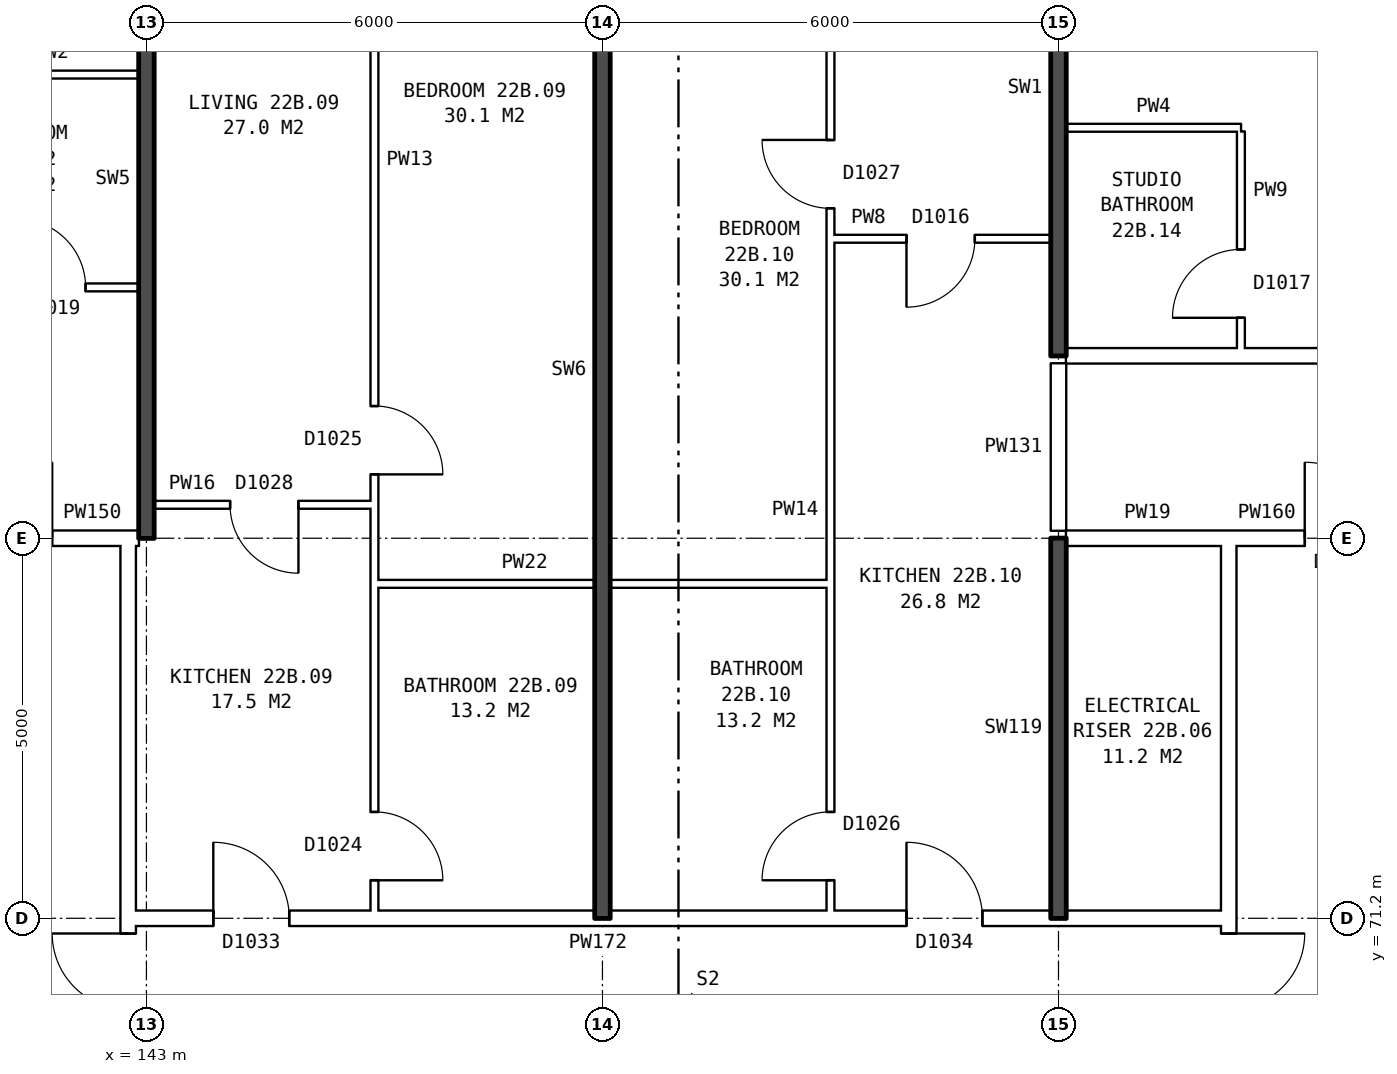
"""IFC4 building model, lengths in metres.
Left out: names, types, materials, properties, quantities, classifications, styles, units other than length and angle.
Written with IfcOpenShell. Run it as: python <this file> out.ifc"""

import sys

from ifc_helpers import new_model, si_unit, direction, frame, frame_2d, origin, place, context, subcontext, project, spatial, rectangle, extrude, element, fill, save


model = new_model("IFC4")
c1 = context("Model", 3, precision=1e-05, world=origin(), true_north=direction((0.0, 1.0)))
c2 = subcontext(c1, "Body", "Model", "MODEL_VIEW")
j1 = project(units=[si_unit("LENGTHUNIT", "METRE"), si_unit("PLANEANGLEUNIT", "RADIAN")], contexts=[c1])
p1 = place(None, origin())
s1 = spatial("IfcSite", under=j1, at=p1, CompositionType="ELEMENT")
p2 = place(p1, origin())
s2 = spatial("IfcBuilding", under=s1, at=p2, CompositionType="ELEMENT")
p3 = place(p2, frame((0.0, 0.0, 80.9)))
s3 = spatial("IfcBuildingStorey", under=s2, at=p3, CompositionType="ELEMENT", Elevation=80.9)
p4 = place(p3, frame((142.76, 63.9, 0.0), z_axis=(0.0, 0.0, 1.0), x_axis=(0.0, 1.0, 0.0)))
e1 = element("IfcWall", 1, at=p4, inside=s3, PredefinedType="PARTITIONING", context=c2, shape_type="SweptSolid", body=[
    extrude(rectangle(XDim=12.2, YDim=0.2, at=frame_2d((6.1, 0.0))), origin(), (0.0, 0.0, 1.0), 2.85),
])
p5 = place(p4, frame((5.1, 0.0, 0.0)))
e2 = element("IfcOpeningElement", 2, at=p5, cuts=e1, PredefinedType="OPENING", context=c2, shape_type="SweptSolid", body=[
    extrude(rectangle(XDim=2.0, YDim=2.1, at=frame_2d((1.0, 1.05))), frame((0.0, 0.11, 0.0), z_axis=(0.0, -1.0, 0.0), x_axis=(1.0, 0.0, 0.0)), (0.0, 0.0, 1.0), 0.22),
])
p6 = place(p3, frame((157.24, 63.9, 0.0), z_axis=(0.0, 0.0, 1.0), x_axis=(0.0, 1.0, 0.0)))
e3 = element("IfcWall", 3, at=p6, inside=s3, PredefinedType="PARTITIONING", context=c2, shape_type="SweptSolid", body=[
    extrude(rectangle(XDim=12.2, YDim=0.2, at=frame_2d((6.1, 0.0))), origin(), (0.0, 0.0, 1.0), 2.85),
])
p7 = place(p6, frame((5.1, 0.0, 0.0)))
e4 = element("IfcOpeningElement", 4, at=p7, cuts=e3, PredefinedType="OPENING", context=c2, shape_type="SweptSolid", body=[
    extrude(rectangle(XDim=2.0, YDim=2.1, at=frame_2d((1.0, 1.05))), frame((0.0, 0.11, 0.0), z_axis=(0.0, -1.0, 0.0), x_axis=(1.0, 0.0, 0.0)), (0.0, 0.0, 1.0), 0.22),
])
p8 = place(p3, frame((142.76, 71.2, 0.0), z_axis=(0.0, 0.0, 1.0), x_axis=(1.0, 0.0, 0.0)))
e5 = element("IfcWall", 5, at=p8, inside=s3, PredefinedType="PARTITIONING", context=c2, shape_type="SweptSolid", body=[
    extrude(rectangle(XDim=14.48, YDim=0.2, at=frame_2d((7.24, 0.0))), origin(), (0.0, 0.0, 1.0), 2.85),
])
p9 = place(p8, frame((1.12, 0.0, 0.0)))
e6 = element("IfcOpeningElement", 6, at=p9, cuts=e5, PredefinedType="OPENING", context=c2, shape_type="SweptSolid", body=[
    extrude(rectangle(XDim=1.0, YDim=2.1, at=frame_2d((0.5, 1.05))), frame((0.0, 0.11, 0.0), z_axis=(0.0, -1.0, 0.0), x_axis=(1.0, 0.0, 0.0)), (0.0, 0.0, 1.0), 0.22),
])
p10 = place(p8, frame((10.24, 0.0, 0.0)))
e7 = element("IfcOpeningElement", 7, at=p10, cuts=e5, PredefinedType="OPENING", context=c2, shape_type="SweptSolid", body=[
    extrude(rectangle(XDim=1.0, YDim=2.1, at=frame_2d((0.5, 1.05))), frame((0.0, 0.11, 0.0), z_axis=(0.0, -1.0, 0.0), x_axis=(1.0, 0.0, 0.0)), (0.0, 0.0, 1.0), 0.22),
])
p11 = place(p3, frame((146.0, 75.6, 0.0), z_axis=(0.0, 0.0, 1.0), x_axis=(1.0, 0.0, 0.0)))
e8 = element("IfcWall", 8, at=p11, inside=s3, PredefinedType="PARTITIONING", context=c2, shape_type="SweptSolid", body=[
    extrude(rectangle(XDim=6.0, YDim=0.1, at=frame_2d((3.0, 0.0))), origin(), (0.0, 0.0, 1.0), 2.85),
])
p12 = place(p3, frame((139.76, 76.2, 0.0), z_axis=(0.0, 0.0, 1.0), x_axis=(1.0, 0.0, 0.0)))
e9 = element("IfcWall", 9, at=p12, inside=s3, PredefinedType="PARTITIONING", context=c2, shape_type="SweptSolid", body=[
    extrude(rectangle(XDim=3.0, YDim=0.2, at=frame_2d((1.5, 0.0))), origin(), (0.0, 0.0, 1.0), 2.85),
])
p13 = place(p12, frame((1.0, 0.0, 0.0)))
e10 = element("IfcOpeningElement", 10, at=p13, cuts=e9, PredefinedType="OPENING", context=c2, shape_type="SweptSolid", body=[
    extrude(rectangle(XDim=1.0, YDim=2.1, at=frame_2d((0.5, 1.05))), frame((0.0, 0.11, 0.0), z_axis=(0.0, -1.0, 0.0), x_axis=(1.0, 0.0, 0.0)), (0.0, 0.0, 1.0), 0.22),
])
p14 = place(p3, frame((142.76, 76.2, 0.0), z_axis=(0.0, 0.0, 1.0), x_axis=(1.0, 0.0, 0.0)))
e11 = element("IfcWall", 11, at=p14, inside=s3, PredefinedType="PARTITIONING", context=c2, shape_type="SweptSolid", body=[
    extrude(rectangle(XDim=0.14, YDim=0.2, at=frame_2d((0.07, 0.0))), origin(), (0.0, 0.0, 1.0), 2.85),
])
p15 = place(p3, frame((155.1, 76.2, 0.0), z_axis=(0.0, 0.0, 1.0), x_axis=(1.0, 0.0, 0.0)))
e12 = element("IfcWall", 12, at=p15, inside=s3, PredefinedType="PARTITIONING", context=c2, shape_type="SweptSolid", body=[
    extrude(rectangle(XDim=2.14, YDim=0.2, at=frame_2d((1.07, 0.0))), origin(), (0.0, 0.0, 1.0), 2.85),
])
p16 = place(p3, frame((157.24, 76.2, 0.0), z_axis=(0.0, 0.0, 1.0), x_axis=(1.0, 0.0, 0.0)))
e13 = element("IfcWall", 13, at=p16, inside=s3, PredefinedType="PARTITIONING", context=c2, shape_type="SweptSolid", body=[
    extrude(rectangle(XDim=3.0, YDim=0.2, at=frame_2d((1.5, 0.0))), origin(), (0.0, 0.0, 1.0), 2.85),
])
p17 = place(p16, frame((1.0, 0.0, 0.0)))
e14 = element("IfcOpeningElement", 14, at=p17, cuts=e13, PredefinedType="OPENING", context=c2, shape_type="SweptSolid", body=[
    extrude(rectangle(XDim=1.0, YDim=2.1, at=frame_2d((0.5, 1.05))), frame((0.0, 0.11, 0.0), z_axis=(0.0, -1.0, 0.0), x_axis=(1.0, 0.0, 0.0)), (0.0, 0.0, 1.0), 0.22),
])
p18 = place(p3, frame((143.1, 76.64, 0.0), z_axis=(0.0, 0.0, 1.0), x_axis=(1.0, 0.0, 0.0)))
e15 = element("IfcWall", 15, at=p18, inside=s3, PredefinedType="PARTITIONING", context=c2, shape_type="SweptSolid", body=[
    extrude(rectangle(XDim=2.9, YDim=0.1, at=frame_2d((1.45, 0.0))), origin(), (0.0, 0.0, 1.0), 2.85),
])
p19 = place(p18, frame((1.0, 0.0, 0.0)))
e16 = element("IfcOpeningElement", 16, at=p19, cuts=e15, PredefinedType="OPENING", context=c2, shape_type="SweptSolid", body=[
    extrude(rectangle(XDim=0.9, YDim=2.1, at=frame_2d((0.45, 1.05))), frame((0.0, 0.06, 0.0), z_axis=(0.0, -1.0, 0.0), x_axis=(1.0, 0.0, 0.0)), (0.0, 0.0, 1.0), 0.12),
])
p20 = place(p3, frame((155.1, 78.6, 0.0), z_axis=(0.0, 0.0, 1.0), x_axis=(1.0, 0.0, 0.0)))
e17 = element("IfcWall", 17, at=p20, inside=s3, PredefinedType="PARTITIONING", context=c2, shape_type="SweptSolid", body=[
    extrude(rectangle(XDim=19.79, YDim=0.2, at=frame_2d((9.895, 0.0))), origin(), (0.0, 0.0, 1.0), 2.85),
])
p21 = place(p20, frame((3.6, 0.0, 0.0)))
e18 = element("IfcOpeningElement", 18, at=p21, cuts=e17, PredefinedType="OPENING", context=c2, shape_type="SweptSolid", body=[
    extrude(rectangle(XDim=1.0, YDim=2.1, at=frame_2d((0.5, 1.05))), frame((0.0, 0.11, 0.0), z_axis=(0.0, -1.0, 0.0), x_axis=(1.0, 0.0, 0.0)), (0.0, 0.0, 1.0), 0.22),
])
p22 = place(p20, frame((7.4, 0.0, 0.0)))
e19 = element("IfcOpeningElement", 19, at=p22, cuts=e17, PredefinedType="OPENING", context=c2, shape_type="SweptSolid", body=[
    extrude(rectangle(XDim=1.0, YDim=2.1, at=frame_2d((0.5, 1.05))), frame((0.0, 0.11, 0.0), z_axis=(0.0, -1.0, 0.0), x_axis=(1.0, 0.0, 0.0)), (0.0, 0.0, 1.0), 0.22),
])
p23 = place(p20, frame((16.545, 0.0, 0.0)))
e20 = element("IfcOpeningElement", 20, at=p23, cuts=e17, PredefinedType="OPENING", context=c2, shape_type="SweptSolid", body=[
    extrude(rectangle(XDim=1.0, YDim=2.1, at=frame_2d((0.5, 1.05))), frame((0.0, 0.11, 0.0), z_axis=(0.0, -1.0, 0.0), x_axis=(1.0, 0.0, 0.0)), (0.0, 0.0, 1.0), 0.22),
])
p24 = place(p3, frame((137.1, 79.5, 0.0), z_axis=(0.0, 0.0, 1.0), x_axis=(1.0, 0.0, 0.0)))
e21 = element("IfcWall", 21, at=p24, inside=s3, PredefinedType="PARTITIONING", context=c2, shape_type="SweptSolid", body=[
    extrude(rectangle(XDim=5.8, YDim=0.1, at=frame_2d((2.9, 0.0))), origin(), (0.0, 0.0, 1.0), 2.85),
])
p25 = place(p24, frame((1.3, 0.0, 0.0)))
e22 = element("IfcOpeningElement", 22, at=p25, cuts=e21, PredefinedType="OPENING", context=c2, shape_type="SweptSolid", body=[
    extrude(rectangle(XDim=0.9, YDim=2.1, at=frame_2d((0.45, 1.05))), frame((0.0, 0.06, 0.0), z_axis=(0.0, -1.0, 0.0), x_axis=(1.0, 0.0, 0.0)), (0.0, 0.0, 1.0), 0.12),
])
p26 = place(p24, frame((4.2, 0.0, 0.0)))
e23 = element("IfcOpeningElement", 23, at=p26, cuts=e21, PredefinedType="OPENING", context=c2, shape_type="SweptSolid", body=[
    extrude(rectangle(XDim=0.9, YDim=2.1, at=frame_2d((0.45, 1.05))), frame((0.0, 0.06, 0.0), z_axis=(0.0, -1.0, 0.0), x_axis=(1.0, 0.0, 0.0)), (0.0, 0.0, 1.0), 0.12),
])
p27 = place(p3, frame((152.0, 80.14, 0.0), z_axis=(0.0, 0.0, 1.0), x_axis=(1.0, 0.0, 0.0)))
e24 = element("IfcWall", 24, at=p27, inside=s3, PredefinedType="PARTITIONING", context=c2, shape_type="SweptSolid", body=[
    extrude(rectangle(XDim=2.9, YDim=0.1, at=frame_2d((1.45, 0.0))), origin(), (0.0, 0.0, 1.0), 2.85),
])
p28 = place(p27, frame((1.0, 0.0, 0.0)))
e25 = element("IfcOpeningElement", 25, at=p28, cuts=e24, PredefinedType="OPENING", context=c2, shape_type="SweptSolid", body=[
    extrude(rectangle(XDim=0.9, YDim=2.1, at=frame_2d((0.45, 1.05))), frame((0.0, 0.06, 0.0), z_axis=(0.0, -1.0, 0.0), x_axis=(1.0, 0.0, 0.0)), (0.0, 0.0, 1.0), 0.12),
])
for number, where, z_axis, x_axis in (
    (26, (155.1, 81.6, 0.0), (0.0, 0.0, 1.0), (1.0, 0.0, 0.0)),
    (27, (140.6, 82.3, 0.0), (0.0, 0.0, 1.0), (1.0, 0.0, 0.0)),
):
    element("IfcWall", number, at=place(p3, frame(where, z_axis=z_axis, x_axis=x_axis)), inside=s3, PredefinedType="PARTITIONING", context=c2, shape_type="SweptSolid", body=[
        extrude(rectangle(XDim=2.3, YDim=0.1, at=frame_2d((1.15, 0.0))), origin(), (0.0, 0.0, 1.0), 2.85),
    ])
p29 = place(p3, frame((143.0, 76.2, 0.0), z_axis=(0.0, 0.0, 1.0), x_axis=(0.0, 1.0, 0.0)))
e28 = element("IfcWall", 28, at=p29, inside=s3, PredefinedType="SOLIDWALL", context=c2, shape_type="SweptSolid", body=[
    extrude(rectangle(XDim=9.44, YDim=0.2, at=frame_2d((4.72, 0.0))), origin(), (0.0, 0.0, 1.0), 2.85),
])
p30 = place(p3, frame((146.0, 71.3, 0.0), z_axis=(0.0, 0.0, 1.0), x_axis=(0.0, 1.0, 0.0)))
e29 = element("IfcWall", 29, at=p30, inside=s3, PredefinedType="PARTITIONING", context=c2, shape_type="SweptSolid", body=[
    extrude(rectangle(XDim=14.34, YDim=0.1, at=frame_2d((7.17, 0.0))), origin(), (0.0, 0.0, 1.0), 2.85),
])
p31 = place(p30, frame((5.74, 0.0, 0.0)))
e30 = element("IfcOpeningElement", 30, at=p31, cuts=e29, PredefinedType="OPENING", context=c2, shape_type="SweptSolid", body=[
    extrude(rectangle(XDim=0.9, YDim=2.1, at=frame_2d((0.45, 1.05))), frame((0.0, 0.06, 0.0), z_axis=(0.0, -1.0, 0.0), x_axis=(1.0, 0.0, 0.0)), (0.0, 0.0, 1.0), 0.12),
])
p32 = place(p30, frame((0.4, 0.0, 0.0)))
e31 = element("IfcOpeningElement", 31, at=p32, cuts=e29, PredefinedType="OPENING", context=c2, shape_type="SweptSolid", body=[
    extrude(rectangle(XDim=0.9, YDim=2.1, at=frame_2d((0.45, 1.05))), frame((0.0, 0.06, 0.0), z_axis=(0.0, -1.0, 0.0), x_axis=(1.0, 0.0, 0.0)), (0.0, 0.0, 1.0), 0.12),
])
p33 = place(p3, frame((149.0, 71.2, 0.0), z_axis=(0.0, 0.0, 1.0), x_axis=(0.0, 1.0, 0.0)))
e32 = element("IfcWall", 32, at=p33, inside=s3, PredefinedType="SOLIDWALL", context=c2, shape_type="SweptSolid", body=[
    extrude(rectangle(XDim=14.44, YDim=0.2, at=frame_2d((7.22, 0.0))), origin(), (0.0, 0.0, 1.0), 2.85),
])
p34 = place(p3, frame((152.0, 71.3, 0.0), z_axis=(0.0, 0.0, 1.0), x_axis=(0.0, 1.0, 0.0)))
e33 = element("IfcWall", 33, at=p34, inside=s3, PredefinedType="PARTITIONING", context=c2, shape_type="SweptSolid", body=[
    extrude(rectangle(XDim=14.34, YDim=0.1, at=frame_2d((7.17, 0.0))), origin(), (0.0, 0.0, 1.0), 2.85),
])
p35 = place(p34, frame((9.24, 0.0, 0.0)))
e34 = element("IfcOpeningElement", 34, at=p35, cuts=e33, PredefinedType="OPENING", context=c2, shape_type="SweptSolid", body=[
    extrude(rectangle(XDim=0.9, YDim=2.1, at=frame_2d((0.45, 1.05))), frame((0.0, 0.06, 0.0), z_axis=(0.0, -1.0, 0.0), x_axis=(1.0, 0.0, 0.0)), (0.0, 0.0, 1.0), 0.12),
])
p36 = place(p34, frame((0.4, 0.0, 0.0)))
e35 = element("IfcOpeningElement", 35, at=p36, cuts=e33, PredefinedType="OPENING", context=c2, shape_type="SweptSolid", body=[
    extrude(rectangle(XDim=0.9, YDim=2.1, at=frame_2d((0.45, 1.05))), frame((0.0, 0.06, 0.0), z_axis=(0.0, -1.0, 0.0), x_axis=(1.0, 0.0, 0.0)), (0.0, 0.0, 1.0), 0.12),
])
p37 = place(p3, frame((155.0, 71.2, 0.0), z_axis=(0.0, 0.0, 1.0), x_axis=(0.0, 1.0, 0.0)))
e36 = element("IfcWall", 36, at=p37, inside=s3, PredefinedType="SOLIDWALL", context=c2, shape_type="SweptSolid", body=[
    extrude(rectangle(XDim=5.0, YDim=0.2, at=frame_2d((2.5, 0.0))), origin(), (0.0, 0.0, 1.0), 2.85),
])
p38 = place(p3, frame((155.0, 76.3, 0.0), z_axis=(0.0, 0.0, 1.0), x_axis=(0.0, 1.0, 0.0)))
e37 = element("IfcWall", 37, at=p38, inside=s3, PredefinedType="PARTITIONING", context=c2, shape_type="SweptSolid", body=[
    extrude(rectangle(XDim=2.2, YDim=0.2, at=frame_2d((1.1, 0.0))), origin(), (0.0, 0.0, 1.0), 2.85),
])
p39 = place(p3, frame((155.0, 78.6, 0.0), z_axis=(0.0, 0.0, 1.0), x_axis=(0.0, 1.0, 0.0)))
e38 = element("IfcWall", 38, at=p39, inside=s3, PredefinedType="SOLIDWALL", context=c2, shape_type="SweptSolid", body=[
    extrude(rectangle(XDim=7.04, YDim=0.2, at=frame_2d((3.52, 0.0))), origin(), (0.0, 0.0, 1.0), 2.85),
])
p40 = place(p3, frame((157.4, 78.7, 0.0), z_axis=(0.0, 0.0, 1.0), x_axis=(0.0, 1.0, 0.0)))
e39 = element("IfcWall", 39, at=p40, inside=s3, PredefinedType="PARTITIONING", context=c2, shape_type="SweptSolid", body=[
    extrude(rectangle(XDim=2.85, YDim=0.1, at=frame_2d((1.425, 0.0))), origin(), (0.0, 0.0, 1.0), 2.85),
])
p41 = place(p40, frame((0.4, 0.0, 0.0)))
e40 = element("IfcOpeningElement", 40, at=p41, cuts=e39, PredefinedType="OPENING", context=c2, shape_type="SweptSolid", body=[
    extrude(rectangle(XDim=0.9, YDim=2.1, at=frame_2d((0.45, 1.05))), frame((0.0, 0.06, 0.0), z_axis=(0.0, -1.0, 0.0), x_axis=(1.0, 0.0, 0.0)), (0.0, 0.0, 1.0), 0.12),
])
p42 = place(p5, origin())
e41 = element("IfcDoor", 41, at=p42, inside=s3, OperationType="DOUBLE_DOOR_SINGLE_SWING", PredefinedType="DOOR", context=c2, shape_type="SweptSolid", body=[
    extrude(rectangle(XDim=2.0, YDim=2.1, at=frame_2d((1.0, 1.05))), frame((0.0, 0.025, 0.0), z_axis=(0.0, -1.0, 0.0), x_axis=(1.0, 0.0, 0.0)), (0.0, 0.0, 1.0), 0.05),
])
fill(e2, e41)
p43 = place(p7, frame((2.0, 0.0, 0.0), z_axis=(0.0, 0.0, 1.0), x_axis=(-1.0, 0.0, 0.0)))
e42 = element("IfcDoor", 42, at=p43, inside=s3, OperationType="DOUBLE_DOOR_SINGLE_SWING", PredefinedType="DOOR", context=c2, shape_type="SweptSolid", body=[
    extrude(rectangle(XDim=2.0, YDim=2.1, at=frame_2d((1.0, 1.05))), frame((0.0, 0.025, 0.0), z_axis=(0.0, -1.0, 0.0), x_axis=(1.0, 0.0, 0.0)), (0.0, 0.0, 1.0), 0.05),
])
fill(e4, e42)
p44 = place(p17, origin())
e43 = element("IfcDoor", 43, at=p44, inside=s3, OperationType="SINGLE_SWING_LEFT", PredefinedType="DOOR", context=c2, shape_type="SweptSolid", body=[
    extrude(rectangle(XDim=1.0, YDim=2.1, at=frame_2d((0.5, 1.05))), frame((0.0, 0.025, 0.0), z_axis=(0.0, -1.0, 0.0), x_axis=(1.0, 0.0, 0.0)), (0.0, 0.0, 1.0), 0.05),
])
fill(e14, e43)
p45 = place(p26, origin())
e44 = element("IfcDoor", 44, at=p45, inside=s3, OperationType="SINGLE_SWING_LEFT", PredefinedType="DOOR", context=c2, shape_type="SweptSolid", body=[
    extrude(rectangle(XDim=0.9, YDim=2.1, at=frame_2d((0.45, 1.05))), frame((0.0, 0.025, 0.0), z_axis=(0.0, -1.0, 0.0), x_axis=(1.0, 0.0, 0.0)), (0.0, 0.0, 1.0), 0.05),
])
fill(e23, e44)
p46 = place(p31, frame((0.9, 0.0, 0.0), z_axis=(0.0, 0.0, 1.0), x_axis=(-1.0, 0.0, 0.0)))
e45 = element("IfcDoor", 45, at=p46, inside=s3, OperationType="SINGLE_SWING_RIGHT", PredefinedType="DOOR", context=c2, shape_type="SweptSolid", body=[
    extrude(rectangle(XDim=0.9, YDim=2.1, at=frame_2d((0.45, 1.05))), frame((0.0, 0.025, 0.0), z_axis=(0.0, -1.0, 0.0), x_axis=(1.0, 0.0, 0.0)), (0.0, 0.0, 1.0), 0.05),
])
fill(e30, e45)
p47 = place(p9, origin())
e46 = element("IfcDoor", 46, at=p47, inside=s3, OperationType="SINGLE_SWING_LEFT", PredefinedType="DOOR", context=c2, shape_type="SweptSolid", body=[
    extrude(rectangle(XDim=1.0, YDim=2.1, at=frame_2d((0.5, 1.05))), frame((0.0, 0.025, 0.0), z_axis=(0.0, -1.0, 0.0), x_axis=(1.0, 0.0, 0.0)), (0.0, 0.0, 1.0), 0.05),
])
fill(e6, e46)
p48 = place(p19, frame((0.9, 0.0, 0.0), z_axis=(0.0, 0.0, 1.0), x_axis=(-1.0, 0.0, 0.0)))
e47 = element("IfcDoor", 47, at=p48, inside=s3, OperationType="SINGLE_SWING_LEFT", PredefinedType="DOOR", context=c2, shape_type="SweptSolid", body=[
    extrude(rectangle(XDim=0.9, YDim=2.1, at=frame_2d((0.45, 1.05))), frame((0.0, 0.025, 0.0), z_axis=(0.0, -1.0, 0.0), x_axis=(1.0, 0.0, 0.0)), (0.0, 0.0, 1.0), 0.05),
])
fill(e16, e47)
p49 = place(p32, frame((0.9, 0.0, 0.0), z_axis=(0.0, 0.0, 1.0), x_axis=(-1.0, 0.0, 0.0)))
e48 = element("IfcDoor", 48, at=p49, inside=s3, OperationType="SINGLE_SWING_RIGHT", PredefinedType="DOOR", context=c2, shape_type="SweptSolid", body=[
    extrude(rectangle(XDim=0.9, YDim=2.1, at=frame_2d((0.45, 1.05))), frame((0.0, 0.025, 0.0), z_axis=(0.0, -1.0, 0.0), x_axis=(1.0, 0.0, 0.0)), (0.0, 0.0, 1.0), 0.05),
])
fill(e31, e48)
p50 = place(p35, origin())
e49 = element("IfcDoor", 49, at=p50, inside=s3, OperationType="SINGLE_SWING_RIGHT", PredefinedType="DOOR", context=c2, shape_type="SweptSolid", body=[
    extrude(rectangle(XDim=0.9, YDim=2.1, at=frame_2d((0.45, 1.05))), frame((0.0, 0.025, 0.0), z_axis=(0.0, -1.0, 0.0), x_axis=(1.0, 0.0, 0.0)), (0.0, 0.0, 1.0), 0.05),
])
fill(e34, e49)
p51 = place(p10, origin())
e50 = element("IfcDoor", 50, at=p51, inside=s3, OperationType="SINGLE_SWING_LEFT", PredefinedType="DOOR", context=c2, shape_type="SweptSolid", body=[
    extrude(rectangle(XDim=1.0, YDim=2.1, at=frame_2d((0.5, 1.05))), frame((0.0, 0.025, 0.0), z_axis=(0.0, -1.0, 0.0), x_axis=(1.0, 0.0, 0.0)), (0.0, 0.0, 1.0), 0.05),
])
fill(e7, e50)
p52 = place(p28, frame((0.9, 0.0, 0.0), z_axis=(0.0, 0.0, 1.0), x_axis=(-1.0, 0.0, 0.0)))
e51 = element("IfcDoor", 51, at=p52, inside=s3, OperationType="SINGLE_SWING_RIGHT", PredefinedType="DOOR", context=c2, shape_type="SweptSolid", body=[
    extrude(rectangle(XDim=0.9, YDim=2.1, at=frame_2d((0.45, 1.05))), frame((0.0, 0.025, 0.0), z_axis=(0.0, -1.0, 0.0), x_axis=(1.0, 0.0, 0.0)), (0.0, 0.0, 1.0), 0.05),
])
fill(e25, e51)
p53 = place(p36, origin())
e52 = element("IfcDoor", 52, at=p53, inside=s3, OperationType="SINGLE_SWING_LEFT", PredefinedType="DOOR", context=c2, shape_type="SweptSolid", body=[
    extrude(rectangle(XDim=0.9, YDim=2.1, at=frame_2d((0.45, 1.05))), frame((0.0, 0.025, 0.0), z_axis=(0.0, -1.0, 0.0), x_axis=(1.0, 0.0, 0.0)), (0.0, 0.0, 1.0), 0.05),
])
fill(e35, e52)
p54 = place(p41, origin())
e53 = element("IfcDoor", 53, at=p54, inside=s3, OperationType="SINGLE_SWING_LEFT", PredefinedType="DOOR", context=c2, shape_type="SweptSolid", body=[
    extrude(rectangle(XDim=0.9, YDim=2.1, at=frame_2d((0.45, 1.05))), frame((0.0, 0.025, 0.0), z_axis=(0.0, -1.0, 0.0), x_axis=(1.0, 0.0, 0.0)), (0.0, 0.0, 1.0), 0.05),
])
fill(e40, e53)
save(model, sys.argv[1])
